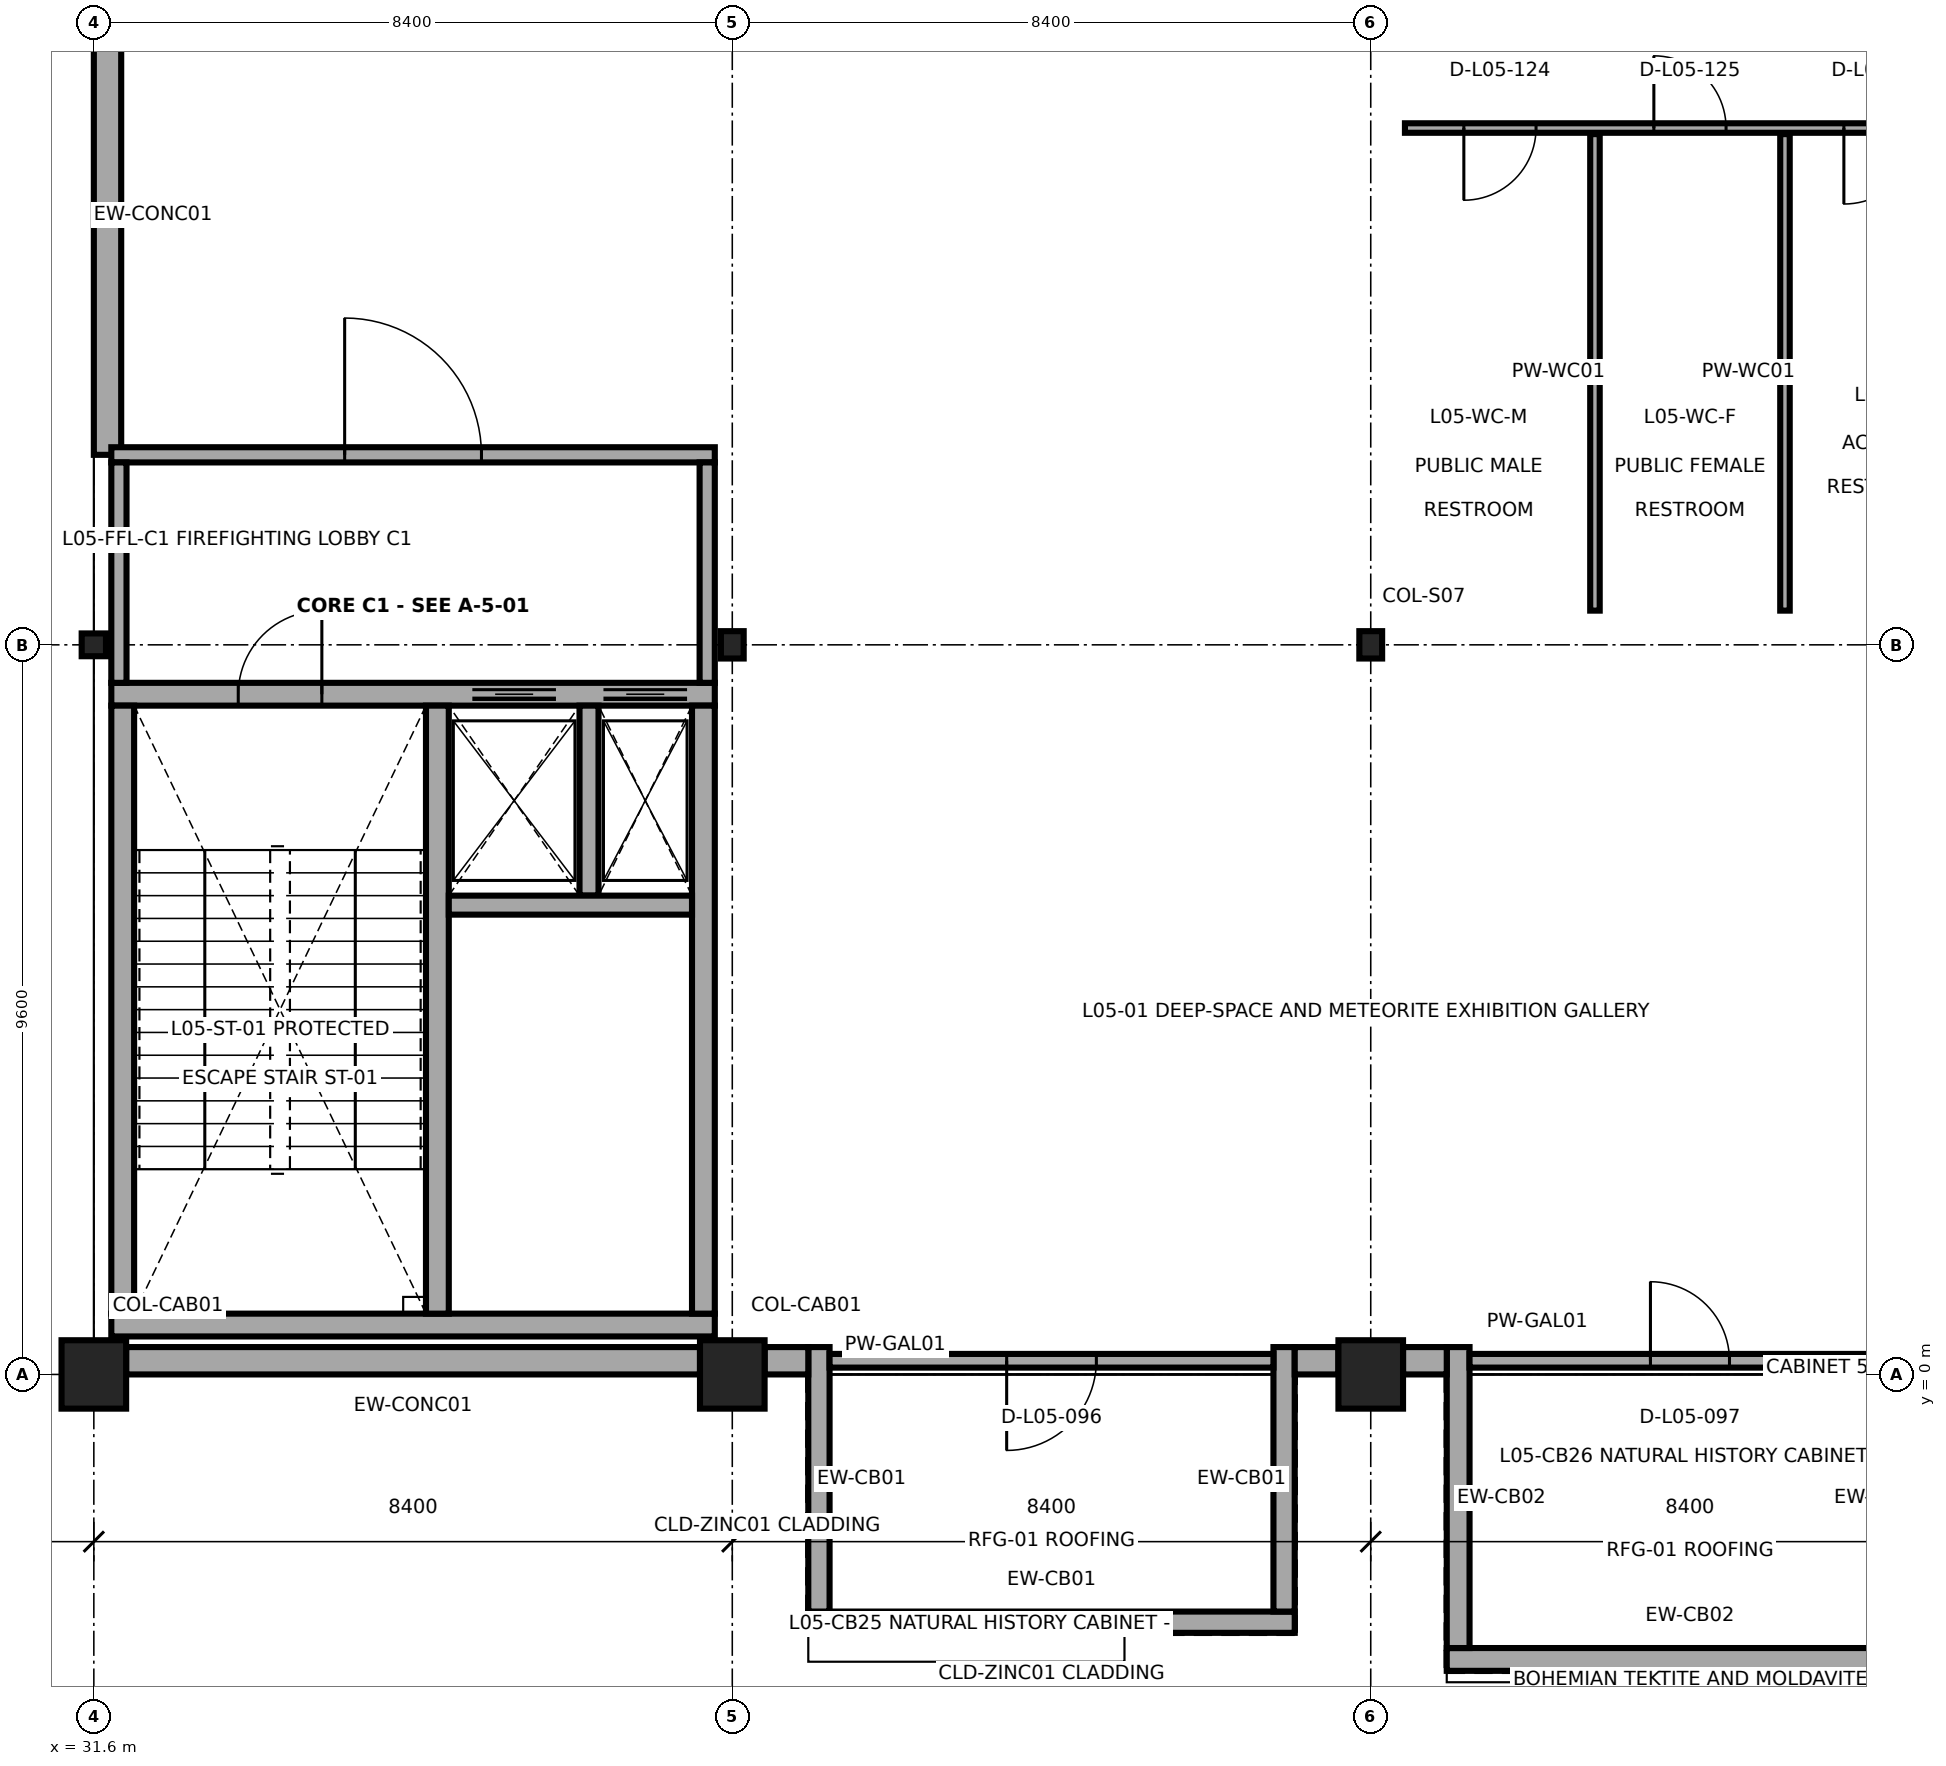
"""IFC4 building model, lengths in metres.
Left out: names, types, materials, properties, quantities, classifications, styles, units other than length and angle.
Written with IfcOpenShell. Run it as: python <this file> out.ifc"""

import sys

from ifc_helpers import new_model, si_unit, direction, frame, frame_2d, origin, origin_2d, place, context, subcontext, project, spatial, rectangle, i_section, extrude, element, fill, save


model = new_model("IFC4")
c1 = context("Model", 3, precision=1e-05, world=origin(), true_north=direction((0.0, 1.0)))
c2 = subcontext(c1, "Body", "Model", "MODEL_VIEW")
j1 = project(units=[si_unit("LENGTHUNIT", "METRE"), si_unit("PLANEANGLEUNIT", "RADIAN")], contexts=[c1])
p1 = place(None, origin())
s1 = spatial("IfcSite", under=j1, at=p1, CompositionType="ELEMENT")
p2 = place(p1, origin())
s2 = spatial("IfcBuilding", under=s1, at=p2, CompositionType="ELEMENT")
p3 = place(p2, frame((0.0, 0.0, 26.4)))
s3 = spatial("IfcBuildingStorey", under=s2, at=p3, CompositionType="ELEMENT", Elevation=26.4)
p4 = place(p3, frame((31.6, 0.0, 0.0), z_axis=(0.0, 0.0, 1.0), x_axis=(1.0, 0.0, 0.0)))
e1 = element("IfcColumn", 1, at=p4, inside=s3, PredefinedType="COLUMN", context=c2, shape_type="SweptSolid", body=[
    extrude(rectangle(XDim=0.85, YDim=0.9, at=origin_2d()), origin(), (0.0, 0.0, 1.0), 4.8),
])
p5 = place(p3, frame((31.6, 9.6, 0.0), z_axis=(0.0, 0.0, 1.0), x_axis=(0.0, 1.0, 0.0)))
e2 = element("IfcColumn", 2, at=p5, inside=s3, PredefinedType="COLUMN", context=c2, shape_type="SweptSolid", body=[
    extrude(i_section(OverallWidth=0.3, OverallDepth=0.32, WebThickness=0.011, FlangeThickness=0.021, FilletRadius=0.027, at=origin_2d()), origin(), (0.0, 0.0, 1.0), 4.8),
])
p6 = place(p3, frame((40.0, 0.0, 0.0), z_axis=(0.0, 0.0, 1.0), x_axis=(1.0, 0.0, 0.0)))
e3 = element("IfcColumn", 3, at=p6, inside=s3, PredefinedType="COLUMN", context=c2, shape_type="SweptSolid", body=[
    extrude(rectangle(XDim=0.85, YDim=0.9, at=origin_2d()), origin(), (0.0, 0.0, 1.0), 4.8),
])
p7 = place(p3, frame((40.0, 9.6, 0.0), z_axis=(0.0, 0.0, 1.0), x_axis=(1.0, 0.0, 0.0)))
e4 = element("IfcColumn", 4, at=p7, inside=s3, PredefinedType="COLUMN", context=c2, shape_type="SweptSolid", body=[
    extrude(i_section(OverallWidth=0.3, OverallDepth=0.36, WebThickness=0.012, FlangeThickness=0.022, FilletRadius=0.027, at=origin_2d()), origin(), (0.0, 0.0, 1.0), 4.8),
])
p8 = place(p3, frame((48.4, 0.0, 0.0), z_axis=(0.0, 0.0, 1.0), x_axis=(1.0, 0.0, 0.0)))
e5 = element("IfcColumn", 5, at=p8, inside=s3, PredefinedType="COLUMN", context=c2, shape_type="SweptSolid", body=[
    extrude(rectangle(XDim=0.85, YDim=0.9, at=origin_2d()), origin(), (0.0, 0.0, 1.0), 4.8),
])
p9 = place(p3, frame((48.4, 9.6, 0.0), z_axis=(0.0, 0.0, 1.0), x_axis=(1.0, 0.0, 0.0)))
e6 = element("IfcColumn", 6, at=p9, inside=s3, PredefinedType="COLUMN", context=c2, shape_type="SweptSolid", body=[
    extrude(i_section(OverallWidth=0.3, OverallDepth=0.36, WebThickness=0.012, FlangeThickness=0.022, FilletRadius=0.027, at=origin_2d()), origin(), (0.0, 0.0, 1.0), 4.8),
])
p10 = place(p3, frame((41.0, -3.26, 0.0), z_axis=(0.0, 0.0, 1.0), x_axis=(1.0, 0.0, 0.0)))
e7 = element("IfcWall", 7, at=p10, inside=s3, PredefinedType="SOLIDWALL", context=c2, shape_type="SweptSolid", body=[
    extrude(rectangle(XDim=6.4, YDim=0.28, at=frame_2d((3.2, 0.0))), origin(), (0.0, 0.0, 1.0), 2.99),
])
for number, where, z_axis, x_axis in (
    (8, (41.14, 0.36, 0.0), (0.0, 0.0, 1.0), (0.0, -1.0, 0.0)),
    (9, (47.26, -3.12, 0.0), (0.0, 0.0, 1.0), (0.0, 1.0, 0.0)),
):
    element("IfcWall", number, at=place(p3, frame(where, z_axis=z_axis, x_axis=x_axis)), inside=s3, PredefinedType="SOLIDWALL", context=c2, shape_type="SweptSolid", body=[
        extrude(rectangle(XDim=3.48, YDim=0.28, at=frame_2d((1.74, 0.0))), origin(), (0.0, 0.0, 1.0), 2.99),
    ])
p11 = place(p3, frame((49.4, -3.75, 0.0), z_axis=(0.0, 0.0, 1.0), x_axis=(1.0, 0.0, 0.0)))
e10 = element("IfcWall", 10, at=p11, inside=s3, PredefinedType="SOLIDWALL", context=c2, shape_type="SweptSolid", body=[
    extrude(rectangle(XDim=6.4, YDim=0.3, at=frame_2d((3.2, 0.0))), origin(), (0.0, 0.0, 1.0), 2.99),
])
p12 = place(p3, frame((49.55, 0.36, 0.0), z_axis=(0.0, 0.0, 1.0), x_axis=(0.0, -1.0, 0.0)))
e11 = element("IfcWall", 11, at=p12, inside=s3, PredefinedType="SOLIDWALL", context=c2, shape_type="SweptSolid", body=[
    extrude(rectangle(XDim=3.96, YDim=0.3, at=frame_2d((1.98, 0.0))), origin(), (0.0, 0.0, 1.0), 2.99),
])
p13 = place(p3, frame((32.025, 0.18, 0.0), z_axis=(0.0, 0.0, 1.0), x_axis=(1.0, 0.0, 0.0)))
e12 = element("IfcWall", 12, at=p13, inside=s3, PredefinedType="SOLIDWALL", context=c2, shape_type="SweptSolid", body=[
    extrude(rectangle(XDim=7.55, YDim=0.36, at=frame_2d((3.775, 0.0))), origin(), (0.0, 0.0, 1.0), 3.625),
])
p14 = place(p3, frame((40.425, 0.18, 0.0), z_axis=(0.0, 0.0, 1.0), x_axis=(1.0, 0.0, 0.0)))
e13 = element("IfcWall", 13, at=p14, inside=s3, PredefinedType="SOLIDWALL", context=c2, shape_type="SweptSolid", body=[
    extrude(rectangle(XDim=0.575, YDim=0.36, at=frame_2d((0.288, 0.0))), origin(), (0.0, 0.0, 1.0), 3.625),
])
p15 = place(p3, frame((47.4, 0.18, 0.0), z_axis=(0.0, 0.0, 1.0), x_axis=(1.0, 0.0, 0.0)))
e14 = element("IfcWall", 14, at=p15, inside=s3, PredefinedType="SOLIDWALL", context=c2, shape_type="SweptSolid", body=[
    extrude(rectangle(XDim=0.575, YDim=0.36, at=frame_2d((0.288, 0.0))), origin(), (0.0, 0.0, 1.0), 3.625),
])
p16 = place(p3, frame((48.825, 0.18, 0.0), z_axis=(0.0, 0.0, 1.0), x_axis=(1.0, 0.0, 0.0)))
e15 = element("IfcWall", 15, at=p16, inside=s3, PredefinedType="SOLIDWALL", context=c2, shape_type="SweptSolid", body=[
    extrude(rectangle(XDim=0.575, YDim=0.36, at=frame_2d((0.288, 0.0))), origin(), (0.0, 0.0, 1.0), 3.625),
])
p17 = place(p3, frame((31.78, 18.75, 0.0), z_axis=(0.0, 0.0, 1.0), x_axis=(0.0, -1.0, 0.0)))
e16 = element("IfcWall", 16, at=p17, inside=s3, PredefinedType="SOLIDWALL", context=c2, shape_type="SweptSolid", body=[
    extrude(rectangle(XDim=6.65, YDim=0.36, at=frame_2d((3.325, 0.0))), origin(), (0.0, 0.0, 1.0), 3.622),
])
p18 = place(p3, frame((31.83, 0.65, 0.0), z_axis=(0.0, 0.0, 1.0), x_axis=(1.0, 0.0, 0.0)))
e17 = element("IfcWall", 17, at=p18, inside=s3, PredefinedType="SHEAR", context=c2, shape_type="SweptSolid", body=[
    extrude(rectangle(XDim=7.94, YDim=0.3, at=frame_2d((3.97, 0.0))), origin(), (0.0, 0.0, 1.0), 4.54),
])
p19 = place(p3, frame((39.77, 8.95, 0.0), z_axis=(0.0, 0.0, 1.0), x_axis=(-1.0, 0.0, 0.0)))
e18 = element("IfcWall", 18, at=p19, inside=s3, PredefinedType="SHEAR", context=c2, shape_type="SweptSolid", body=[
    extrude(rectangle(XDim=7.94, YDim=0.3, at=frame_2d((3.97, 0.0))), origin(), (0.0, 0.0, 1.0), 4.54),
])
p20 = place(p19, frame((5.17, 0.0, 0.0)))
e19 = element("IfcOpeningElement", 19, at=p20, cuts=e18, PredefinedType="OPENING", context=c2, shape_type="SweptSolid", body=[
    extrude(rectangle(XDim=1.1, YDim=2.2, at=frame_2d((0.55, 1.1))), frame((0.0, 0.16, 0.0), z_axis=(0.0, -1.0, 0.0), x_axis=(1.0, 0.0, 0.0)), (0.0, 0.0, 1.0), 0.32),
])
p21 = place(p19, frame((2.09, 0.0, 0.0)))
e20 = element("IfcOpeningElement", 20, at=p21, cuts=e18, PredefinedType="OPENING", context=c2, shape_type="SweptSolid", body=[
    extrude(rectangle(XDim=1.1, YDim=2.1, at=frame_2d((0.55, 1.05))), frame((0.0, 0.16, 0.0), z_axis=(0.0, -1.0, 0.0), x_axis=(1.0, 0.0, 0.0)), (0.0, 0.0, 1.0), 0.32),
])
p22 = place(p19, frame((0.365, 0.0, 0.0)))
e21 = element("IfcOpeningElement", 21, at=p22, cuts=e18, PredefinedType="OPENING", context=c2, shape_type="SweptSolid", body=[
    extrude(rectangle(XDim=1.1, YDim=2.1, at=frame_2d((0.55, 1.05))), frame((0.0, 0.16, 0.0), z_axis=(0.0, -1.0, 0.0), x_axis=(1.0, 0.0, 0.0)), (0.0, 0.0, 1.0), 0.32),
])
for number, where, z_axis, x_axis in (
    (22, (31.98, 8.8, 0.0), (0.0, 0.0, 1.0), (0.0, -1.0, 0.0)),
    (23, (39.62, 0.8, 0.0), (0.0, 0.0, 1.0), (0.0, 1.0, 0.0)),
    (24, (36.12, 0.8, 0.0), (0.0, 0.0, 1.0), (0.0, 1.0, 0.0)),
):
    element("IfcWall", number, at=place(p3, frame(where, z_axis=z_axis, x_axis=x_axis)), inside=s3, PredefinedType="SHEAR", context=c2, shape_type="SweptSolid", body=[
        extrude(rectangle(XDim=8.0, YDim=0.3, at=frame_2d((4.0, 0.0))), origin(), (0.0, 0.0, 1.0), 4.54),
    ])
p23 = place(p3, frame((38.115, 6.3, 0.0), z_axis=(0.0, 0.0, 1.0), x_axis=(0.0, 1.0, 0.0)))
e25 = element("IfcWall", 25, at=p23, inside=s3, PredefinedType="SHEAR", context=c2, shape_type="SweptSolid", body=[
    extrude(rectangle(XDim=2.5, YDim=0.25, at=frame_2d((1.25, 0.0))), origin(), (0.0, 0.0, 1.0), 4.54),
])
p24 = place(p3, frame((36.27, 6.175, 0.0), z_axis=(0.0, 0.0, 1.0), x_axis=(1.0, 0.0, 0.0)))
e26 = element("IfcWall", 26, at=p24, inside=s3, PredefinedType="SHEAR", context=c2, shape_type="SweptSolid", body=[
    extrude(rectangle(XDim=3.2, YDim=0.25, at=frame_2d((1.6, 0.0))), origin(), (0.0, 0.0, 1.0), 4.54),
])
p25 = place(p3, frame((31.83, 12.1, 0.0), z_axis=(0.0, 0.0, 1.0), x_axis=(1.0, 0.0, 0.0)))
e27 = element("IfcWall", 27, at=p25, inside=s3, PredefinedType="SOLIDWALL", context=c2, shape_type="SweptSolid", body=[
    extrude(rectangle(XDim=7.94, YDim=0.2, at=frame_2d((3.97, 0.0))), origin(), (0.0, 0.0, 1.0), 4.192),
])
p26 = place(p25, frame((3.07, 0.0, 0.0)))
e28 = element("IfcOpeningElement", 28, at=p26, cuts=e27, PredefinedType="OPENING", context=c2, shape_type="SweptSolid", body=[
    extrude(rectangle(XDim=1.8, YDim=2.2, at=frame_2d((0.9, 1.1))), frame((0.0, 0.11, 0.0), z_axis=(0.0, -1.0, 0.0), x_axis=(1.0, 0.0, 0.0)), (0.0, 0.0, 1.0), 0.22),
])
for number, where, z_axis, x_axis in (
    (29, (31.93, 9.1, 0.0), (0.0, 0.0, 1.0), (0.0, 1.0, 0.0)),
    (30, (39.67, 12.0, 0.0), (0.0, 0.0, 1.0), (0.0, -1.0, 0.0)),
):
    element("IfcWall", number, at=place(p3, frame(where, z_axis=z_axis, x_axis=x_axis)), inside=s3, PredefinedType="SOLIDWALL", context=c2, shape_type="SweptSolid", body=[
        extrude(rectangle(XDim=2.9, YDim=0.2, at=frame_2d((1.45, 0.0))), origin(), (0.0, 0.0, 1.0), 4.232),
    ])
p27 = place(p3, frame((41.28, 0.18, 0.0), z_axis=(0.0, 0.0, 1.0), x_axis=(1.0, 0.0, 0.0)))
e31 = element("IfcWall", 31, at=p27, inside=s3, PredefinedType="PARTITIONING", context=c2, shape_type="SweptSolid", body=[
    extrude(rectangle(XDim=5.84, YDim=0.18, at=frame_2d((2.92, 0.0))), origin(), (0.0, 0.0, 1.0), 2.99),
])
p28 = place(p27, frame((2.33, 0.0, 0.0)))
e32 = element("IfcOpeningElement", 32, at=p28, cuts=e31, PredefinedType="OPENING", context=c2, shape_type="SweptSolid", body=[
    extrude(rectangle(XDim=1.18, YDim=2.25, at=frame_2d((0.59, 1.125))), frame((0.0, 0.1, 0.0), z_axis=(0.0, -1.0, 0.0), x_axis=(1.0, 0.0, 0.0)), (0.0, 0.0, 1.0), 0.2),
])
p29 = place(p3, frame((49.7, 0.18, 0.0), z_axis=(0.0, 0.0, 1.0), x_axis=(1.0, 0.0, 0.0)))
e33 = element("IfcWall", 33, at=p29, inside=s3, PredefinedType="PARTITIONING", context=c2, shape_type="SweptSolid", body=[
    extrude(rectangle(XDim=5.8, YDim=0.18, at=frame_2d((2.9, 0.0))), origin(), (0.0, 0.0, 1.0), 2.99),
])
p30 = place(p29, frame((2.38, 0.0, 0.0)))
e34 = element("IfcOpeningElement", 34, at=p30, cuts=e33, PredefinedType="OPENING", context=c2, shape_type="SweptSolid", body=[
    extrude(rectangle(XDim=1.04, YDim=2.18, at=frame_2d((0.52, 1.09))), frame((0.0, 0.1, 0.0), z_axis=(0.0, -1.0, 0.0), x_axis=(1.0, 0.0, 0.0)), (0.0, 0.0, 1.0), 0.2),
])
p31 = place(p3, frame((48.85, 16.4, 0.0), z_axis=(0.0, 0.0, 1.0), x_axis=(1.0, 0.0, 0.0)))
e35 = element("IfcWall", 35, at=p31, inside=s3, PredefinedType="PARTITIONING", context=c2, shape_type="SweptSolid", body=[
    extrude(rectangle(XDim=7.5, YDim=0.125, at=frame_2d((3.75, 0.0))), origin(), (0.0, 0.0, 1.0), 4.192),
])
p32 = place(p31, frame((0.775, 0.0, 0.0)))
e36 = element("IfcOpeningElement", 36, at=p32, cuts=e35, PredefinedType="OPENING", context=c2, shape_type="SweptSolid", body=[
    extrude(rectangle(XDim=0.95, YDim=2.1, at=frame_2d((0.475, 1.05))), frame((0.0, 0.073, 0.0), z_axis=(0.0, -1.0, 0.0), x_axis=(1.0, 0.0, 0.0)), (0.0, 0.0, 1.0), 0.145),
])
p33 = place(p31, frame((3.275, 0.0, 0.0)))
e37 = element("IfcOpeningElement", 37, at=p33, cuts=e35, PredefinedType="OPENING", context=c2, shape_type="SweptSolid", body=[
    extrude(rectangle(XDim=0.95, YDim=2.1, at=frame_2d((0.475, 1.05))), frame((0.0, 0.073, 0.0), z_axis=(0.0, -1.0, 0.0), x_axis=(1.0, 0.0, 0.0)), (0.0, 0.0, 1.0), 0.145),
])
p34 = place(p31, frame((5.775, 0.0, 0.0)))
e38 = element("IfcOpeningElement", 38, at=p34, cuts=e35, PredefinedType="OPENING", context=c2, shape_type="SweptSolid", body=[
    extrude(rectangle(XDim=1.0, YDim=2.12, at=frame_2d((0.5, 1.06))), frame((0.0, 0.073, 0.0), z_axis=(0.0, -1.0, 0.0), x_axis=(1.0, 0.0, 0.0)), (0.0, 0.0, 1.0), 0.145),
])
for number, where, z_axis, x_axis in (
    (39, (51.35, 10.05, 0.0), (0.0, 0.0, 1.0), (0.0, 1.0, 0.0)),
    (40, (53.85, 10.05, 0.0), (0.0, 0.0, 1.0), (0.0, 1.0, 0.0)),
):
    element("IfcWall", number, at=place(p3, frame(where, z_axis=z_axis, x_axis=x_axis)), inside=s3, PredefinedType="PARTITIONING", context=c2, shape_type="SweptSolid", body=[
        extrude(rectangle(XDim=6.27, YDim=0.125, at=frame_2d((3.135, 0.0))), origin(), (0.0, 0.0, 1.0), 4.52),
    ])
p35 = place(p20, origin())
e41 = element("IfcDoor", 41, at=p35, inside=s3, OperationType="SINGLE_SWING_RIGHT", PredefinedType="DOOR", context=c2, shape_type="SweptSolid", body=[
    extrude(rectangle(XDim=1.1, YDim=2.2, at=frame_2d((0.55, 1.1))), frame((0.0, 0.025, 0.0), z_axis=(0.0, -1.0, 0.0), x_axis=(1.0, 0.0, 0.0)), (0.0, 0.0, 1.0), 0.05),
])
fill(e19, e41)
p36 = place(p21, origin())
e42 = element("IfcDoor", 42, at=p36, inside=s3, OperationType="SLIDING_TO_LEFT", PredefinedType="DOOR", context=c2, shape_type="SweptSolid", body=[
    extrude(rectangle(XDim=1.1, YDim=2.1, at=frame_2d((0.55, 1.05))), frame((0.0, 0.025, 0.0), z_axis=(0.0, -1.0, 0.0), x_axis=(1.0, 0.0, 0.0)), (0.0, 0.0, 1.0), 0.05),
])
fill(e20, e42)
p37 = place(p22, origin())
e43 = element("IfcDoor", 43, at=p37, inside=s3, OperationType="SLIDING_TO_LEFT", PredefinedType="DOOR", context=c2, shape_type="SweptSolid", body=[
    extrude(rectangle(XDim=1.1, YDim=2.1, at=frame_2d((0.55, 1.05))), frame((0.0, 0.025, 0.0), z_axis=(0.0, -1.0, 0.0), x_axis=(1.0, 0.0, 0.0)), (0.0, 0.0, 1.0), 0.05),
])
fill(e21, e43)
p38 = place(p26, origin())
e44 = element("IfcDoor", 44, at=p38, inside=s3, OperationType="DOUBLE_DOOR_SINGLE_SWING", PredefinedType="DOOR", context=c2, shape_type="SweptSolid", body=[
    extrude(rectangle(XDim=1.8, YDim=2.2, at=frame_2d((0.9, 1.1))), frame((0.0, 0.025, 0.0), z_axis=(0.0, -1.0, 0.0), x_axis=(1.0, 0.0, 0.0)), (0.0, 0.0, 1.0), 0.05),
])
fill(e28, e44)
p39 = place(p28, origin())
e45 = element("IfcDoor", 45, at=p39, inside=s3, OperationType="SINGLE_SWING_RIGHT", PredefinedType="DOOR", context=c2, shape_type="SweptSolid", body=[
    extrude(rectangle(XDim=1.18, YDim=2.25, at=frame_2d((0.59, 1.125))), frame((0.0, 0.025, 0.0), z_axis=(0.0, -1.0, 0.0), x_axis=(1.0, 0.0, 0.0)), (0.0, 0.0, 1.0), 0.05),
])
fill(e32, e45)
p40 = place(p30, origin())
e46 = element("IfcDoor", 46, at=p40, inside=s3, OperationType="SINGLE_SWING_LEFT", PredefinedType="DOOR", context=c2, shape_type="SweptSolid", body=[
    extrude(rectangle(XDim=1.04, YDim=2.18, at=frame_2d((0.52, 1.09))), frame((0.0, 0.025, 0.0), z_axis=(0.0, -1.0, 0.0), x_axis=(1.0, 0.0, 0.0)), (0.0, 0.0, 1.0), 0.05),
])
fill(e34, e46)
p41 = place(p32, frame((0.95, 0.0, 0.0), z_axis=(0.0, 0.0, 1.0), x_axis=(-1.0, 0.0, 0.0)))
e47 = element("IfcDoor", 47, at=p41, inside=s3, OperationType="SINGLE_SWING_RIGHT", PredefinedType="DOOR", context=c2, shape_type="SweptSolid", body=[
    extrude(rectangle(XDim=0.95, YDim=2.1, at=frame_2d((0.475, 1.05))), frame((0.0, 0.025, 0.0), z_axis=(0.0, -1.0, 0.0), x_axis=(1.0, 0.0, 0.0)), (0.0, 0.0, 1.0), 0.05),
])
fill(e36, e47)
p42 = place(p33, frame((0.95, 0.0, 0.0), z_axis=(0.0, 0.0, 1.0), x_axis=(-1.0, 0.0, 0.0)))
e48 = element("IfcDoor", 48, at=p42, inside=s3, OperationType="SINGLE_SWING_LEFT", PredefinedType="DOOR", context=c2, shape_type="SweptSolid", body=[
    extrude(rectangle(XDim=0.95, YDim=2.1, at=frame_2d((0.475, 1.05))), frame((0.0, 0.025, 0.0), z_axis=(0.0, -1.0, 0.0), x_axis=(1.0, 0.0, 0.0)), (0.0, 0.0, 1.0), 0.05),
])
fill(e37, e48)
p43 = place(p34, frame((1.0, 0.0, 0.0), z_axis=(0.0, 0.0, 1.0), x_axis=(-1.0, 0.0, 0.0)))
e49 = element("IfcDoor", 49, at=p43, inside=s3, OperationType="SINGLE_SWING_RIGHT", PredefinedType="DOOR", context=c2, shape_type="SweptSolid", body=[
    extrude(rectangle(XDim=1.0, YDim=2.12, at=frame_2d((0.5, 1.06))), frame((0.0, 0.025, 0.0), z_axis=(0.0, -1.0, 0.0), x_axis=(1.0, 0.0, 0.0)), (0.0, 0.0, 1.0), 0.05),
])
fill(e38, e49)
save(model, sys.argv[1])
